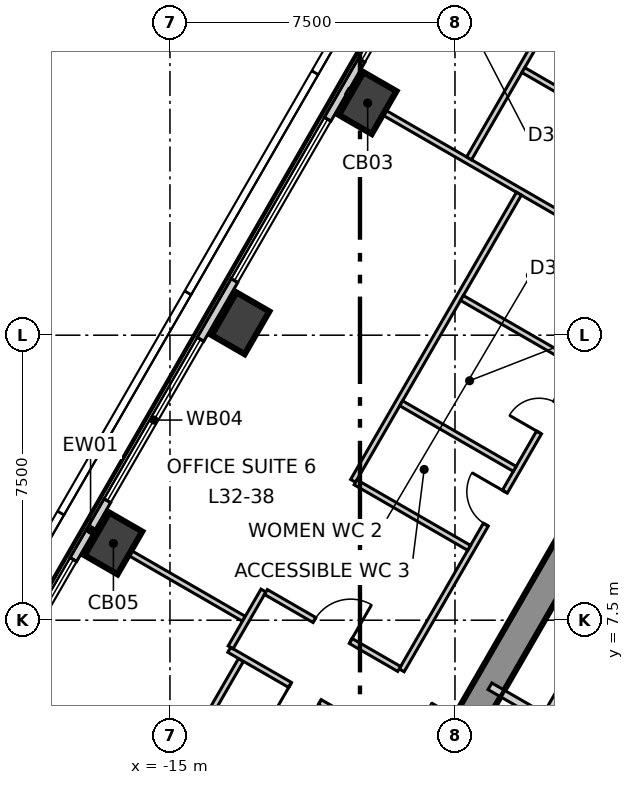
"""IFC4 building model, lengths in metres.
Left out: names, types, materials, properties, quantities, classifications, styles, units other than length and angle.
Written with IfcOpenShell. Run it as: python <this file> out.ifc"""

import sys

from ifc_helpers import new_model, si_unit, direction, frame, frame_2d, origin, origin_2d, place, context, subcontext, project, spatial, polyline, rectangle, outline, extrude, element, fill, save


model = new_model("IFC4")
c1 = context("Model", 3, precision=1e-05, world=origin(), true_north=direction((0.0, 1.0)))
c2 = subcontext(c1, "Body", "Model", "MODEL_VIEW")
j1 = project(units=[si_unit("LENGTHUNIT", "METRE"), si_unit("PLANEANGLEUNIT", "RADIAN")], contexts=[c1])
p1 = place(None, origin())
s1 = spatial("IfcSite", under=j1, at=p1, CompositionType="ELEMENT")
p2 = place(p1, origin())
s2 = spatial("IfcBuilding", under=s1, at=p2, CompositionType="ELEMENT")
p3 = place(p2, frame((0.0, 0.0, 140.3)))
s3 = spatial("IfcBuildingStorey", under=s2, at=p3, CompositionType="ELEMENT", Elevation=140.3)
p4 = place(p3, frame((-1.674, 14.3, -0.3), z_axis=(0.0, 0.0, 1.0), x_axis=(-0.499995765644, -0.866027848477, 0.0)))
e1 = element("IfcWall", 1, at=p4, inside=s3, PredefinedType="SHEAR", context=c2, shape_type="SweptSolid", body=[
    extrude(outline(polyline([(-0.231, -0.4), (1.732, -0.4), (3.695, -0.4), (5.658, -0.4), (7.621, -0.4), (9.584, -0.4), (11.547, -0.4), (13.51, -0.4), (15.473, -0.4), (17.436, -0.4), (19.399, -0.4), (21.362, -0.4), (23.325, -0.4), (22.863, 0.4), (20.977, 0.4), (19.091, 0.4), (17.205, 0.4), (15.319, 0.4), (13.433, 0.4), (11.547, 0.4), (9.661, 0.4), (7.775, 0.4), (5.889, 0.4), (4.003, 0.4), (2.117, 0.4), (0.231, 0.4), (-0.231, -0.4)])), origin(), (0.0, 0.0, 1.0), 4.0),
])
p5 = place(p4, frame((10.997, 0.0, 0.3)))
e2 = element("IfcOpeningElement", 2, at=p5, cuts=e1, PredefinedType="OPENING", context=c2, shape_type="SweptSolid", body=[
    extrude(rectangle(XDim=1.1, YDim=2.1, at=frame_2d((0.55, 1.05))), frame((0.0, 0.41, 0.0), z_axis=(0.0, -1.0, 0.0), x_axis=(1.0, 0.0, 0.0)), (0.0, 0.0, 1.0), 0.82),
])
p6 = place(p4, frame((4.474, 0.0, 0.3)))
e3 = element("IfcOpeningElement", 3, at=p6, cuts=e1, PredefinedType="OPENING", context=c2, shape_type="SweptSolid", body=[
    extrude(rectangle(XDim=0.9, YDim=2.1, at=frame_2d((0.45, 1.05))), frame((0.0, 0.41, 0.0), z_axis=(0.0, -1.0, 0.0), x_axis=(1.0, 0.0, 0.0)), (0.0, 0.0, 1.0), 0.82),
])
for number, where, z_axis, x_axis in (
    (4, (-9.798, 21.107, -0.3), (0.0, 0.0, 1.0), (0.5, 0.866, 0.0)),
    (5, (-13.143, 15.313, -0.3), (0.0, 0.0, 1.0), (0.5, 0.866, 0.0)),
    (6, (-16.488, 9.52, -0.3), (0.0, 0.0, 1.0), (0.5, 0.866, 0.0)),
):
    element("IfcColumn", number, at=place(p3, frame(where, z_axis=z_axis, x_axis=x_axis)), inside=s3, PredefinedType="COLUMN", context=c2, shape_type="SweptSolid", body=[
        extrude(rectangle(XDim=1.3, YDim=1.0, at=origin_2d()), origin(), (0.0, 0.0, 1.0), 4.0),
    ])
p7 = place(p3, frame((-3.063, 34.172, 0.0), z_axis=(0.0, 0.0, 1.0), x_axis=(-0.500008098571, -0.866020728022, 0.0)))
e7 = element("IfcWall", 7, at=p7, inside=s3, PredefinedType="ELEMENTEDWALL", context=c2, shape_type="SweptSolid", body=[
    extrude(rectangle(XDim=56.105, YDim=0.2, at=frame_2d((28.052, 0.0))), origin(), (0.0, 0.0, 1.0), 3.7),
])
p8 = place(p7, frame((2.197, 0.0, 0.9)))
e8 = element("IfcOpeningElement", 8, at=p8, cuts=e7, PredefinedType="OPENING", context=c2, shape_type="SweptSolid", body=[
    extrude(rectangle(XDim=4.9, YDim=2.5, at=frame_2d((2.45, 1.25))), frame((0.0, 0.11, 0.0), z_axis=(0.0, -1.0, 0.0), x_axis=(1.0, 0.0, 0.0)), (0.0, 0.0, 1.0), 0.22),
])
p9 = place(p7, frame((8.887, 0.0, 0.9)))
e9 = element("IfcOpeningElement", 9, at=p9, cuts=e7, PredefinedType="OPENING", context=c2, shape_type="SweptSolid", body=[
    extrude(rectangle(XDim=4.9, YDim=2.5, at=frame_2d((2.45, 1.25))), frame((0.0, 0.11, 0.0), z_axis=(0.0, -1.0, 0.0), x_axis=(1.0, 0.0, 0.0)), (0.0, 0.0, 1.0), 0.22),
])
p10 = place(p7, frame((15.577, 0.0, 0.9)))
e10 = element("IfcOpeningElement", 10, at=p10, cuts=e7, PredefinedType="OPENING", context=c2, shape_type="SweptSolid", body=[
    extrude(rectangle(XDim=4.9, YDim=2.5, at=frame_2d((2.45, 1.25))), frame((0.0, 0.11, 0.0), z_axis=(0.0, -1.0, 0.0), x_axis=(1.0, 0.0, 0.0)), (0.0, 0.0, 1.0), 0.22),
])
p11 = place(p7, frame((22.267, 0.0, 0.9)))
e11 = element("IfcOpeningElement", 11, at=p11, cuts=e7, PredefinedType="OPENING", context=c2, shape_type="SweptSolid", body=[
    extrude(rectangle(XDim=4.9, YDim=2.5, at=frame_2d((2.45, 1.25))), frame((0.0, 0.11, 0.0), z_axis=(0.0, -1.0, 0.0), x_axis=(1.0, 0.0, 0.0)), (0.0, 0.0, 1.0), 0.22),
])
p12 = place(p7, frame((28.957, 0.0, 0.9)))
e12 = element("IfcOpeningElement", 12, at=p12, cuts=e7, PredefinedType="OPENING", context=c2, shape_type="SweptSolid", body=[
    extrude(rectangle(XDim=4.9, YDim=2.5, at=frame_2d((2.45, 1.25))), frame((0.0, 0.11, 0.0), z_axis=(0.0, -1.0, 0.0), x_axis=(1.0, 0.0, 0.0)), (0.0, 0.0, 1.0), 0.22),
])
p13 = place(p7, frame((35.647, 0.0, 0.9)))
e13 = element("IfcOpeningElement", 13, at=p13, cuts=e7, PredefinedType="OPENING", context=c2, shape_type="SweptSolid", body=[
    extrude(rectangle(XDim=4.9, YDim=2.5, at=frame_2d((2.45, 1.25))), frame((0.0, 0.11, 0.0), z_axis=(0.0, -1.0, 0.0), x_axis=(1.0, 0.0, 0.0)), (0.0, 0.0, 1.0), 0.22),
])
p14 = place(p7, frame((42.337, 0.0, 0.9)))
e14 = element("IfcOpeningElement", 14, at=p14, cuts=e7, PredefinedType="OPENING", context=c2, shape_type="SweptSolid", body=[
    extrude(rectangle(XDim=4.9, YDim=2.5, at=frame_2d((2.45, 1.25))), frame((0.0, 0.11, 0.0), z_axis=(0.0, -1.0, 0.0), x_axis=(1.0, 0.0, 0.0)), (0.0, 0.0, 1.0), 0.22),
])
p15 = place(p7, frame((49.027, 0.0, 0.9)))
e15 = element("IfcOpeningElement", 15, at=p15, cuts=e7, PredefinedType="OPENING", context=c2, shape_type="SweptSolid", body=[
    extrude(rectangle(XDim=4.9, YDim=2.5, at=frame_2d((2.45, 1.25))), frame((0.0, 0.11, 0.0), z_axis=(0.0, -1.0, 0.0), x_axis=(1.0, 0.0, 0.0)), (0.0, 0.0, 1.0), 0.22),
])
p16 = place(p3, frame((-8.902, 6.181, 0.0), z_axis=(0.0, 0.0, 1.0), x_axis=(0.499992688384, 0.866029625107, 0.0)))
e16 = element("IfcWall", 16, at=p16, inside=s3, PredefinedType="PARTITIONING", context=c2, shape_type="SweptSolid", body=[
    extrude(rectangle(XDim=17.804, YDim=0.15, at=frame_2d((8.902, 0.0))), origin(), (0.0, 0.0, 1.0), 3.7),
])
p17 = place(p16, frame((14.554, 0.0, 0.0)))
e17 = element("IfcOpeningElement", 17, at=p17, cuts=e16, PredefinedType="OPENING", context=c2, shape_type="SweptSolid", body=[
    extrude(rectangle(XDim=1.1, YDim=2.1, at=frame_2d((0.55, 1.05))), frame((0.0, 0.085, 0.0), z_axis=(0.0, -1.0, 0.0), x_axis=(1.0, 0.0, 0.0)), (0.0, 0.0, 1.0), 0.17),
])
p18 = place(p16, frame((10.428, 0.0, 0.0)))
e18 = element("IfcOpeningElement", 18, at=p18, cuts=e16, PredefinedType="OPENING", context=c2, shape_type="SweptSolid", body=[
    extrude(rectangle(XDim=0.9, YDim=2.1, at=frame_2d((0.45, 1.05))), frame((0.0, 0.085, 0.0), z_axis=(0.0, -1.0, 0.0), x_axis=(1.0, 0.0, 0.0)), (0.0, 0.0, 1.0), 0.17),
])
p19 = place(p16, frame((7.228, 0.0, 0.0)))
e19 = element("IfcOpeningElement", 19, at=p19, cuts=e16, PredefinedType="OPENING", context=c2, shape_type="SweptSolid", body=[
    extrude(rectangle(XDim=0.9, YDim=2.1, at=frame_2d((0.45, 1.05))), frame((0.0, 0.085, 0.0), z_axis=(0.0, -1.0, 0.0), x_axis=(1.0, 0.0, 0.0)), (0.0, 0.0, 1.0), 0.17),
])
p20 = place(p16, frame((4.428, 0.0, 0.0)))
e20 = element("IfcOpeningElement", 20, at=p20, cuts=e16, PredefinedType="OPENING", context=c2, shape_type="SweptSolid", body=[
    extrude(rectangle(XDim=1.0, YDim=2.1, at=frame_2d((0.5, 1.05))), frame((0.0, 0.085, 0.0), z_axis=(0.0, -1.0, 0.0), x_axis=(1.0, 0.0, 0.0)), (0.0, 0.0, 1.0), 0.17),
])
p21 = place(p3, frame((-17.025, 9.83, 0.0), z_axis=(0.0, 0.0, 1.0), x_axis=(0.866032154434, -0.49998830735, 0.0)))
e21 = element("IfcWall", 21, at=p21, inside=s3, PredefinedType="PARTITIONING", context=c2, shape_type="SweptSolid", body=[
    extrude(rectangle(XDim=4.584, YDim=0.15, at=frame_2d((2.292, 0.0))), origin(), (0.0, 0.0, 1.0), 3.2),
])
p22 = place(p3, frame((-14.894, 3.403, 0.0), z_axis=(0.0, 0.0, 1.0), x_axis=(0.500064136673, 0.865988371292, 0.0)))
e22 = element("IfcWall", 22, at=p22, inside=s3, PredefinedType="PARTITIONING", context=c2, shape_type="SweptSolid", body=[
    extrude(rectangle(XDim=3.525, YDim=0.15, at=frame_2d((1.763, 0.0))), origin(), (0.0, 0.0, 1.0), 3.7),
])
p23 = place(p3, frame((-13.44, 6.721, 0.0), z_axis=(0.0, 0.0, 1.0), x_axis=(0.865997263264, -0.500048737644, 0.0)))
e23 = element("IfcWall", 23, at=p23, inside=s3, PredefinedType="PARTITIONING", context=c2, shape_type="SweptSolid", body=[
    extrude(rectangle(XDim=4.124, YDim=0.15, at=frame_2d((2.062, 0.0))), origin(), (0.0, 0.0, 1.0), 3.7),
])
p24 = place(p23, frame((1.85, 0.0, 0.0)))
e24 = element("IfcOpeningElement", 24, at=p24, cuts=e23, PredefinedType="OPENING", context=c2, shape_type="SweptSolid", body=[
    extrude(rectangle(XDim=0.9, YDim=2.1, at=frame_2d((0.45, 1.05))), frame((0.0, 0.085, 0.0), z_axis=(0.0, -1.0, 0.0), x_axis=(1.0, 0.0, 0.0)), (0.0, 0.0, 1.0), 0.17),
])
p25 = place(p3, frame((-13.403, 6.786, 0.0), z_axis=(0.0, 0.0, 1.0), x_axis=(0.500171514983, 0.865926356915, 0.0)))
e25 = element("IfcWall", 25, at=p25, inside=s3, PredefinedType="PARTITIONING", context=c2, shape_type="SweptSolid", body=[
    extrude(rectangle(XDim=1.726, YDim=0.15, at=frame_2d((0.863, 0.0))), origin(), (0.0, 0.0, 1.0), 3.7),
])
p26 = place(p3, frame((-12.475, 8.242, 0.0), z_axis=(0.0, 0.0, 1.0), x_axis=(0.866060059865, -0.499939969103, 0.0)))
e26 = element("IfcWall", 26, at=p26, inside=s3, PredefinedType="PARTITIONING", context=c2, shape_type="SweptSolid", body=[
    extrude(rectangle(XDim=4.048, YDim=0.15, at=frame_2d((2.024, 0.0))), origin(), (0.0, 0.0, 1.0), 3.7),
])
p27 = place(p26, frame((1.475, 0.0, 0.0)))
e27 = element("IfcOpeningElement", 27, at=p27, cuts=e26, PredefinedType="OPENING", context=c2, shape_type="SweptSolid", body=[
    extrude(rectangle(XDim=1.1, YDim=2.1, at=frame_2d((0.55, 1.05))), frame((0.0, 0.085, 0.0), z_axis=(0.0, -1.0, 0.0), x_axis=(1.0, 0.0, 0.0)), (0.0, 0.0, 1.0), 0.17),
])
p28 = place(p3, frame((-10.335, 21.417, 0.0), z_axis=(0.0, 0.0, 1.0), x_axis=(0.866014327354, -0.50001918445, 0.0)))
e28 = element("IfcWall", 28, at=p28, inside=s3, PredefinedType="PARTITIONING", context=c2, shape_type="SweptSolid", body=[
    extrude(rectangle(XDim=8.784, YDim=0.15, at=frame_2d((4.392, 0.0))), origin(), (0.0, 0.0, 1.0), 3.7),
])
p29 = place(p3, frame((-10.181, 11.167, 0.0), z_axis=(0.0, 0.0, 1.0), x_axis=(0.500033294772, 0.866006180185, 0.0)))
e29 = element("IfcWall", 29, at=p29, inside=s3, PredefinedType="PARTITIONING", context=c2, shape_type="SweptSolid", body=[
    extrude(rectangle(XDim=8.725, YDim=0.15, at=frame_2d((4.363, 0.0))), origin(), (0.0, 0.0, 1.0), 3.7),
])
for number, where, z_axis, x_axis in (
    (30, (-10.116, 11.129, 0.0), (0.0, 0.0, 1.0), (0.866, -0.5, 0.0)),
    (31, (-8.916, 13.208, 0.0), (0.0, 0.0, 1.0), (0.866, -0.5, 0.0)),
    (32, (-7.316, 15.979, 0.0), (0.0, 0.0, 1.0), (0.866, -0.5, 0.0)),
):
    element("IfcWall", number, at=place(p3, frame(where, z_axis=z_axis, x_axis=x_axis)), inside=s3, PredefinedType="PARTITIONING", context=c2, shape_type="SweptSolid", body=[
        extrude(rectangle(XDim=3.45, YDim=0.15, at=frame_2d((1.725, 0.0))), origin(), (0.0, 0.0, 1.0), 3.7),
    ])
p30 = place(p3, frame((-7.129, 19.653, 0.0), z_axis=(0.0, 0.0, 1.0), x_axis=(0.500046929803, 0.865998307155, 0.0)))
e33 = element("IfcWall", 33, at=p30, inside=s3, PredefinedType="PARTITIONING", context=c2, shape_type="SweptSolid", body=[
    extrude(rectangle(XDim=5.449, YDim=0.15, at=frame_2d((2.725, 0.0))), origin(), (0.0, 0.0, 1.0), 3.7),
])
p31 = place(p3, frame((-5.701, 21.975, 0.0), z_axis=(0.0, 0.0, 1.0), x_axis=(0.865977875238, -0.500082312822, 0.0)))
e34 = element("IfcWall", 34, at=p31, inside=s3, PredefinedType="PARTITIONING", context=c2, shape_type="SweptSolid", body=[
    extrude(rectangle(XDim=3.25, YDim=0.15, at=frame_2d((1.625, 0.0))), origin(), (0.0, 0.0, 1.0), 3.7),
])
p32 = place(p3, frame((-6.58, 5.762, 0.0), z_axis=(0.0, 0.0, 1.0), x_axis=(0.866029704776, -0.49999255039, 0.0)))
e35 = element("IfcWall", 35, at=p32, inside=s3, PredefinedType="SOLIDWALL", context=c2, shape_type="SweptSolid", body=[
    extrude(rectangle(XDim=3.782, YDim=0.2, at=frame_2d((1.891, 0.0))), origin(), (0.0, 0.0, 1.0), 3.7),
])
p33 = place(p32, frame((2.279, 0.0, 0.0)))
e36 = element("IfcOpeningElement", 36, at=p33, cuts=e35, PredefinedType="OPENING", context=c2, shape_type="SweptSolid", body=[
    extrude(rectangle(XDim=0.9, YDim=2.1, at=frame_2d((0.45, 1.05))), frame((0.0, 0.11, 0.0), z_axis=(0.0, -1.0, 0.0), x_axis=(1.0, 0.0, 0.0)), (0.0, 0.0, 1.0), 0.22),
])
p34 = place(p3, frame((-5.076, 5.009, 0.0), z_axis=(0.0, 0.0, 1.0), x_axis=(0.50002537861, 0.866010750942, 0.0)))
e37 = element("IfcWall", 37, at=p34, inside=s3, PredefinedType="SOLIDWALL", context=c2, shape_type="SweptSolid", body=[
    extrude(rectangle(XDim=3.0, YDim=0.2, at=frame_2d((1.5, 0.0))), origin(), (0.0, 0.0, 1.0), 3.7),
])
p35 = place(p9, origin())
e38 = element("IfcWindow", 38, at=p35, inside=s3, PartitioningType="SINGLE_PANEL", PredefinedType="WINDOW", context=c2, shape_type="SweptSolid", body=[
    extrude(rectangle(XDim=4.9, YDim=2.5, at=frame_2d((2.45, 1.25))), frame((0.0, 0.03, 0.0), z_axis=(0.0, -1.0, 0.0), x_axis=(1.0, 0.0, 0.0)), (0.0, 0.0, 1.0), 0.06),
])
fill(e9, e38)
p36 = place(p10, origin())
e39 = element("IfcWindow", 39, at=p36, inside=s3, PartitioningType="SINGLE_PANEL", PredefinedType="WINDOW", context=c2, shape_type="SweptSolid", body=[
    extrude(rectangle(XDim=4.9, YDim=2.5, at=frame_2d((2.45, 1.25))), frame((0.0, 0.03, 0.0), z_axis=(0.0, -1.0, 0.0), x_axis=(1.0, 0.0, 0.0)), (0.0, 0.0, 1.0), 0.06),
])
fill(e10, e39)
p37 = place(p11, origin())
e40 = element("IfcWindow", 40, at=p37, inside=s3, PartitioningType="SINGLE_PANEL", PredefinedType="WINDOW", context=c2, shape_type="SweptSolid", body=[
    extrude(rectangle(XDim=4.9, YDim=2.5, at=frame_2d((2.45, 1.25))), frame((0.0, 0.03, 0.0), z_axis=(0.0, -1.0, 0.0), x_axis=(1.0, 0.0, 0.0)), (0.0, 0.0, 1.0), 0.06),
])
fill(e11, e40)
p38 = place(p12, origin())
e41 = element("IfcWindow", 41, at=p38, inside=s3, PartitioningType="SINGLE_PANEL", PredefinedType="WINDOW", context=c2, shape_type="SweptSolid", body=[
    extrude(rectangle(XDim=4.9, YDim=2.5, at=frame_2d((2.45, 1.25))), frame((0.0, 0.03, 0.0), z_axis=(0.0, -1.0, 0.0), x_axis=(1.0, 0.0, 0.0)), (0.0, 0.0, 1.0), 0.06),
])
fill(e12, e41)
p39 = place(p27, origin())
e42 = element("IfcDoor", 42, at=p39, inside=s3, OperationType="SINGLE_SWING_LEFT", PredefinedType="DOOR", context=c2, shape_type="SweptSolid", body=[
    extrude(rectangle(XDim=1.1, YDim=2.1, at=frame_2d((0.55, 1.05))), frame((0.0, 0.025, 0.0), z_axis=(0.0, -1.0, 0.0), x_axis=(1.0, 0.0, 0.0)), (0.0, 0.0, 1.0), 0.05),
])
fill(e27, e42)
p40 = place(p19, origin())
e43 = element("IfcDoor", 43, at=p40, inside=s3, OperationType="SINGLE_SWING_RIGHT", PredefinedType="DOOR", context=c2, shape_type="SweptSolid", body=[
    extrude(rectangle(XDim=0.9, YDim=2.1, at=frame_2d((0.45, 1.05))), frame((0.0, 0.025, 0.0), z_axis=(0.0, -1.0, 0.0), x_axis=(1.0, 0.0, 0.0)), (0.0, 0.0, 1.0), 0.05),
])
fill(e19, e43)
p41 = place(p20, origin())
e44 = element("IfcDoor", 44, at=p41, inside=s3, OperationType="SINGLE_SWING_LEFT", PredefinedType="DOOR", context=c2, shape_type="SweptSolid", body=[
    extrude(rectangle(XDim=1.0, YDim=2.1, at=frame_2d((0.5, 1.05))), frame((0.0, 0.025, 0.0), z_axis=(0.0, -1.0, 0.0), x_axis=(1.0, 0.0, 0.0)), (0.0, 0.0, 1.0), 0.05),
])
fill(e20, e44)
p42 = place(p24, origin())
e45 = element("IfcDoor", 45, at=p42, inside=s3, OperationType="SINGLE_SWING_LEFT", PredefinedType="DOOR", context=c2, shape_type="SweptSolid", body=[
    extrude(rectangle(XDim=0.9, YDim=2.1, at=frame_2d((0.45, 1.05))), frame((0.0, 0.025, 0.0), z_axis=(0.0, -1.0, 0.0), x_axis=(1.0, 0.0, 0.0)), (0.0, 0.0, 1.0), 0.05),
])
fill(e24, e45)
save(model, sys.argv[1])
